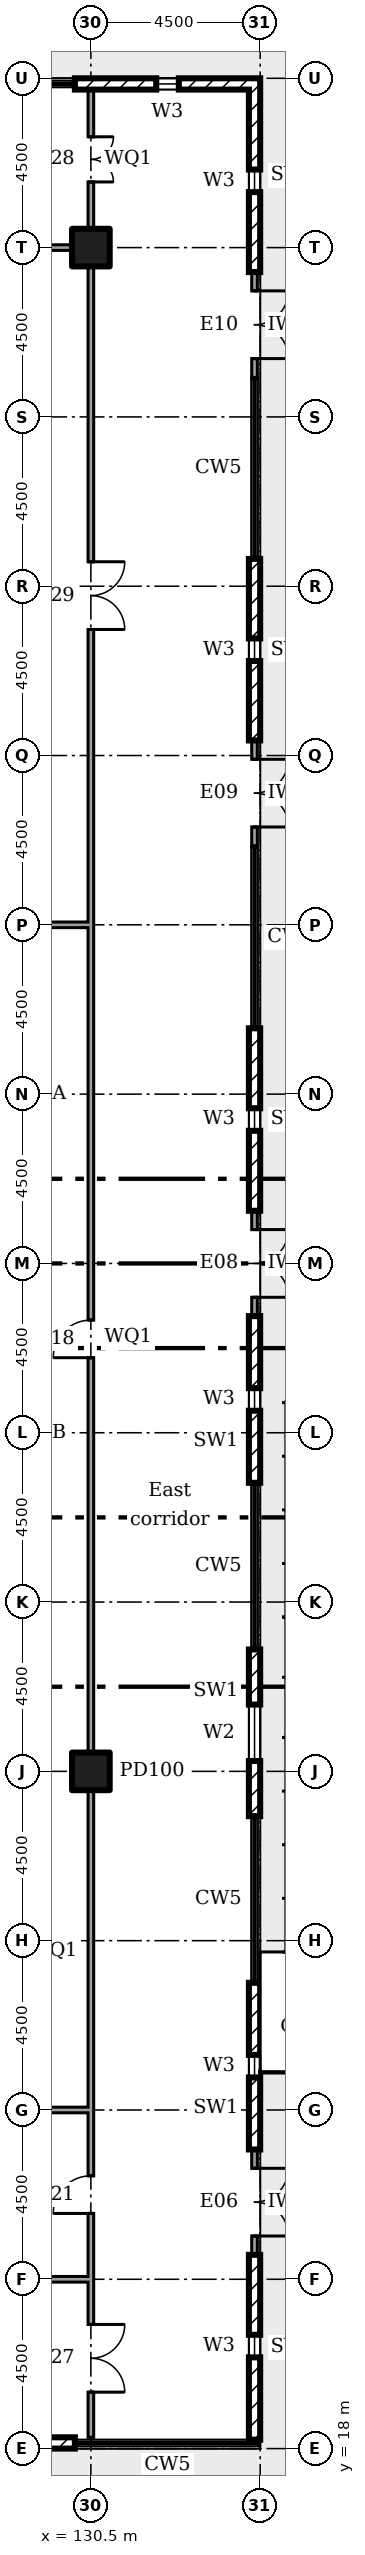
"""IFC4 building model, lengths in metres.
Left out: names, types, materials, properties, quantities, classifications, styles, units other than length and angle.
Written with IfcOpenShell. Run it as: python <this file> out.ifc"""

import sys

from ifc_helpers import new_model, si_unit, direction, frame, frame_2d, origin, origin_2d, place, context, subcontext, project, spatial, rectangle, extrude, element, fill, save


model = new_model("IFC4")
c1 = context("Model", 3, precision=1e-05, world=origin(), true_north=direction((0.0, 1.0)))
c2 = subcontext(c1, "Body", "Model", "MODEL_VIEW")
j1 = project(units=[si_unit("LENGTHUNIT", "METRE"), si_unit("PLANEANGLEUNIT", "RADIAN")], contexts=[c1])
p1 = place(None, origin())
s1 = spatial("IfcSite", under=j1, at=p1, CompositionType="ELEMENT")
p2 = place(p1, origin())
s2 = spatial("IfcBuilding", under=s1, at=p2, CompositionType="ELEMENT")
p3 = place(p2, frame((0.0, 0.0, 11.5)))
s3 = spatial("IfcBuildingStorey", under=s2, at=p3, CompositionType="ELEMENT", Elevation=11.5)
for number, where in (
    (1, (130.5, 36.0, 0.0)),
    (2, (130.5, 76.5, 0.0)),
):
    element("IfcColumn", number, at=place(p3, frame(where)), inside=s3, PredefinedType="COLUMN", context=c2, shape_type="SweptSolid", body=[
        extrude(rectangle(XDim=1.0, YDim=1.0, at=origin_2d()), origin(), (0.0, 0.0, 1.0), 5.0),
    ])
p4 = place(p3, frame((125.15, 18.15, 0.0)))
e3 = element("IfcWall", 3, at=p4, inside=s3, PredefinedType="ELEMENTEDWALL", context=c2, shape_type="SweptSolid", body=[
    extrude(rectangle(XDim=4.925, YDim=0.3, at=frame_2d((2.462, 0.0))), origin(), (0.0, 0.0, 1.0), 4.55),
])
p5 = place(p4, frame((2.163, 0.0, 0.45)))
e4 = element("IfcOpeningElement", 4, at=p5, cuts=e3, PredefinedType="OPENING", context=c2, shape_type="SweptSolid", body=[
    extrude(rectangle(XDim=0.6, YDim=2.4, at=frame_2d((0.3, 1.2))), frame((0.0, 0.16, 0.0), z_axis=(0.0, -1.0, 0.0), x_axis=(1.0, 0.0, 0.0)), (0.0, 0.0, 1.0), 0.32),
])
p6 = place(p3, frame((134.85, 18.238, 0.0), z_axis=(0.0, 0.0, 1.0), x_axis=(0.0, 1.0, 0.0)))
e5 = element("IfcWall", 5, at=p6, inside=s3, PredefinedType="ELEMENTEDWALL", context=c2, shape_type="SweptSolid", body=[
    extrude(rectangle(XDim=4.912, YDim=0.3, at=frame_2d((2.456, 0.0))), origin(), (0.0, 0.0, 1.0), 4.55),
])
p7 = place(p6, frame((2.188, 0.0, 0.45)))
e6 = element("IfcOpeningElement", 6, at=p7, cuts=e5, PredefinedType="OPENING", context=c2, shape_type="SweptSolid", body=[
    extrude(rectangle(XDim=0.6, YDim=2.4, at=frame_2d((0.3, 1.2))), frame((0.0, 0.16, 0.0), z_axis=(0.0, -1.0, 0.0), x_axis=(1.0, 0.0, 0.0)), (0.0, 0.0, 1.0), 0.32),
])
p8 = place(p3, frame((134.85, 23.15, 0.0), z_axis=(0.0, 0.0, 1.0), x_axis=(0.0, 1.0, 0.0)))
e7 = element("IfcWall", 7, at=p8, inside=s3, PredefinedType="SOLIDWALL", context=c2, shape_type="SweptSolid", body=[
    extrude(rectangle(XDim=2.8, YDim=0.15, at=frame_2d((1.4, 0.0))), origin(), (0.0, 0.0, 1.0), 4.55),
])
p9 = place(p8, frame((0.5, 0.0, 0.0)))
e8 = element("IfcOpeningElement", 8, at=p9, cuts=e7, PredefinedType="OPENING", context=c2, shape_type="SweptSolid", body=[
    extrude(rectangle(XDim=1.8, YDim=2.4, at=frame_2d((0.9, 1.2))), frame((0.0, 0.085, 0.0), z_axis=(0.0, -1.0, 0.0), x_axis=(1.0, 0.0, 0.0)), (0.0, 0.0, 1.0), 0.17),
])
p10 = place(p3, frame((134.85, 25.95, 0.0), z_axis=(0.0, 0.0, 1.0), x_axis=(0.0, 1.0, 0.0)))
e9 = element("IfcWall", 9, at=p10, inside=s3, PredefinedType="ELEMENTEDWALL", context=c2, shape_type="SweptSolid", body=[
    extrude(rectangle(XDim=4.43, YDim=0.3, at=frame_2d((2.215, 0.0))), origin(), (0.0, 0.0, 1.0), 4.55),
])
p11 = place(p10, frame((1.915, 0.0, 0.45)))
e10 = element("IfcOpeningElement", 10, at=p11, cuts=e9, PredefinedType="OPENING", context=c2, shape_type="SweptSolid", body=[
    extrude(rectangle(XDim=0.6, YDim=2.4, at=frame_2d((0.3, 1.2))), frame((0.0, 0.16, 0.0), z_axis=(0.0, -1.0, 0.0), x_axis=(1.0, 0.0, 0.0)), (0.0, 0.0, 1.0), 0.32),
])
p12 = place(p3, frame((134.85, 34.81, 0.0), z_axis=(0.0, 0.0, 1.0), x_axis=(0.0, 1.0, 0.0)))
e11 = element("IfcWall", 11, at=p12, inside=s3, PredefinedType="ELEMENTEDWALL", context=c2, shape_type="SweptSolid", body=[
    extrude(rectangle(XDim=4.43, YDim=0.3, at=frame_2d((2.215, 0.0))), origin(), (0.0, 0.0, 1.0), 4.55),
])
p13 = place(p12, frame((1.465, 0.0, 0.9)))
e12 = element("IfcOpeningElement", 12, at=p13, cuts=e11, PredefinedType="OPENING", context=c2, shape_type="SweptSolid", body=[
    extrude(rectangle(XDim=1.5, YDim=1.8, at=frame_2d((0.75, 0.9))), frame((0.0, 0.16, 0.0), z_axis=(0.0, -1.0, 0.0), x_axis=(1.0, 0.0, 0.0)), (0.0, 0.0, 1.0), 0.32),
])
p14 = place(p3, frame((134.85, 43.67, 0.0), z_axis=(0.0, 0.0, 1.0), x_axis=(0.0, 1.0, 0.0)))
e13 = element("IfcWall", 13, at=p14, inside=s3, PredefinedType="ELEMENTEDWALL", context=c2, shape_type="SweptSolid", body=[
    extrude(rectangle(XDim=4.43, YDim=0.3, at=frame_2d((2.215, 0.0))), origin(), (0.0, 0.0, 1.0), 4.55),
])
p15 = place(p14, frame((1.915, 0.0, 0.45)))
e14 = element("IfcOpeningElement", 14, at=p15, cuts=e13, PredefinedType="OPENING", context=c2, shape_type="SweptSolid", body=[
    extrude(rectangle(XDim=0.6, YDim=2.4, at=frame_2d((0.3, 1.2))), frame((0.0, 0.16, 0.0), z_axis=(0.0, -1.0, 0.0), x_axis=(1.0, 0.0, 0.0)), (0.0, 0.0, 1.0), 0.32),
])
p16 = place(p3, frame((134.85, 48.1, 0.0), z_axis=(0.0, 0.0, 1.0), x_axis=(0.0, 1.0, 0.0)))
e15 = element("IfcWall", 15, at=p16, inside=s3, PredefinedType="SOLIDWALL", context=c2, shape_type="SweptSolid", body=[
    extrude(rectangle(XDim=2.8, YDim=0.15, at=frame_2d((1.4, 0.0))), origin(), (0.0, 0.0, 1.0), 4.55),
])
p17 = place(p16, frame((0.5, 0.0, 0.0)))
e16 = element("IfcOpeningElement", 16, at=p17, cuts=e15, PredefinedType="OPENING", context=c2, shape_type="SweptSolid", body=[
    extrude(rectangle(XDim=1.8, YDim=2.4, at=frame_2d((0.9, 1.2))), frame((0.0, 0.085, 0.0), z_axis=(0.0, -1.0, 0.0), x_axis=(1.0, 0.0, 0.0)), (0.0, 0.0, 1.0), 0.17),
])
p18 = place(p3, frame((134.85, 50.9, 0.0), z_axis=(0.0, 0.0, 1.0), x_axis=(0.0, 1.0, 0.0)))
e17 = element("IfcWall", 17, at=p18, inside=s3, PredefinedType="ELEMENTEDWALL", context=c2, shape_type="SweptSolid", body=[
    extrude(rectangle(XDim=4.85, YDim=0.3, at=frame_2d((2.425, 0.0))), origin(), (0.0, 0.0, 1.0), 4.55),
])
p19 = place(p18, frame((2.125, 0.0, 0.45)))
e18 = element("IfcOpeningElement", 18, at=p19, cuts=e17, PredefinedType="OPENING", context=c2, shape_type="SweptSolid", body=[
    extrude(rectangle(XDim=0.6, YDim=2.4, at=frame_2d((0.3, 1.2))), frame((0.0, 0.16, 0.0), z_axis=(0.0, -1.0, 0.0), x_axis=(1.0, 0.0, 0.0)), (0.0, 0.0, 1.0), 0.32),
])
p20 = place(p3, frame((134.85, 60.6, 0.0), z_axis=(0.0, 0.0, 1.0), x_axis=(0.0, 1.0, 0.0)))
e19 = element("IfcWall", 19, at=p20, inside=s3, PredefinedType="SOLIDWALL", context=c2, shape_type="SweptSolid", body=[
    extrude(rectangle(XDim=2.8, YDim=0.15, at=frame_2d((1.4, 0.0))), origin(), (0.0, 0.0, 1.0), 4.55),
])
p21 = place(p20, frame((0.5, 0.0, 0.0)))
e20 = element("IfcOpeningElement", 20, at=p21, cuts=e19, PredefinedType="OPENING", context=c2, shape_type="SweptSolid", body=[
    extrude(rectangle(XDim=1.8, YDim=2.4, at=frame_2d((0.9, 1.2))), frame((0.0, 0.085, 0.0), z_axis=(0.0, -1.0, 0.0), x_axis=(1.0, 0.0, 0.0)), (0.0, 0.0, 1.0), 0.17),
])
p22 = place(p3, frame((134.85, 63.4, 0.0), z_axis=(0.0, 0.0, 1.0), x_axis=(0.0, 1.0, 0.0)))
e21 = element("IfcWall", 21, at=p22, inside=s3, PredefinedType="ELEMENTEDWALL", context=c2, shape_type="SweptSolid", body=[
    extrude(rectangle(XDim=4.825, YDim=0.3, at=frame_2d((2.413, 0.0))), origin(), (0.0, 0.0, 1.0), 4.55),
])
p23 = place(p22, frame((2.113, 0.0, 0.45)))
e22 = element("IfcOpeningElement", 22, at=p23, cuts=e21, PredefinedType="OPENING", context=c2, shape_type="SweptSolid", body=[
    extrude(rectangle(XDim=0.6, YDim=2.4, at=frame_2d((0.3, 1.2))), frame((0.0, 0.16, 0.0), z_axis=(0.0, -1.0, 0.0), x_axis=(1.0, 0.0, 0.0)), (0.0, 0.0, 1.0), 0.32),
])
p24 = place(p3, frame((134.85, 73.05, 0.0), z_axis=(0.0, 0.0, 1.0), x_axis=(0.0, 1.0, 0.0)))
e23 = element("IfcWall", 23, at=p24, inside=s3, PredefinedType="SOLIDWALL", context=c2, shape_type="SweptSolid", body=[
    extrude(rectangle(XDim=2.8, YDim=0.15, at=frame_2d((1.4, 0.0))), origin(), (0.0, 0.0, 1.0), 4.55),
])
p25 = place(p24, frame((0.5, 0.0, 0.0)))
e24 = element("IfcOpeningElement", 24, at=p25, cuts=e23, PredefinedType="OPENING", context=c2, shape_type="SweptSolid", body=[
    extrude(rectangle(XDim=1.8, YDim=2.4, at=frame_2d((0.9, 1.2))), frame((0.0, 0.085, 0.0), z_axis=(0.0, -1.0, 0.0), x_axis=(1.0, 0.0, 0.0)), (0.0, 0.0, 1.0), 0.17),
])
p26 = place(p3, frame((134.85, 75.85, 0.0), z_axis=(0.0, 0.0, 1.0), x_axis=(0.0, 1.0, 0.0)))
e25 = element("IfcWall", 25, at=p26, inside=s3, PredefinedType="ELEMENTEDWALL", context=c2, shape_type="SweptSolid", body=[
    extrude(rectangle(XDim=5.15, YDim=0.3, at=frame_2d((2.575, 0.0))), origin(), (0.0, 0.0, 1.0), 4.55),
])
p27 = place(p26, frame((2.125, 0.0, 0.45)))
e26 = element("IfcOpeningElement", 26, at=p27, cuts=e25, PredefinedType="OPENING", context=c2, shape_type="SweptSolid", body=[
    extrude(rectangle(XDim=0.6, YDim=2.4, at=frame_2d((0.3, 1.2))), frame((0.0, 0.16, 0.0), z_axis=(0.0, -1.0, 0.0), x_axis=(1.0, 0.0, 0.0)), (0.0, 0.0, 1.0), 0.32),
])
p28 = place(p3, frame((134.7, 80.85, 0.0), z_axis=(0.0, 0.0, 1.0), x_axis=(-1.0, 0.0, 0.0)))
e27 = element("IfcWall", 27, at=p28, inside=s3, PredefinedType="ELEMENTEDWALL", context=c2, shape_type="SweptSolid", body=[
    extrude(rectangle(XDim=4.625, YDim=0.3, at=frame_2d((2.312, 0.0))), origin(), (0.0, 0.0, 1.0), 4.55),
])
p29 = place(p28, frame((1.863, 0.0, 0.45)))
e28 = element("IfcOpeningElement", 28, at=p29, cuts=e27, PredefinedType="OPENING", context=c2, shape_type="SweptSolid", body=[
    extrude(rectangle(XDim=0.6, YDim=2.4, at=frame_2d((0.3, 1.2))), frame((0.0, 0.16, 0.0), z_axis=(0.0, -1.0, 0.0), x_axis=(1.0, 0.0, 0.0)), (0.0, 0.0, 1.0), 0.32),
])
p30 = place(p3, frame((130.5, 18.3, 0.0), z_axis=(0.0, 0.0, 1.0), x_axis=(0.0, 1.0, 0.0)))
e29 = element("IfcWall", 29, at=p30, inside=s3, PredefinedType="PARTITIONING", context=c2, shape_type="SweptSolid", body=[
    extrude(rectangle(XDim=4.275, YDim=0.15, at=frame_2d((2.137, 0.0))), origin(), (0.0, 0.0, 1.0), 4.55),
])
p31 = place(p30, frame((1.2, 0.0, 0.0)))
e30 = element("IfcOpeningElement", 30, at=p31, cuts=e29, PredefinedType="OPENING", context=c2, shape_type="SweptSolid", body=[
    extrude(rectangle(XDim=1.8, YDim=2.1, at=frame_2d((0.9, 1.05))), frame((0.0, 0.085, 0.0), z_axis=(0.0, -1.0, 0.0), x_axis=(1.0, 0.0, 0.0)), (0.0, 0.0, 1.0), 0.17),
])
p32 = place(p3, frame((130.5, 76.995, 0.0), z_axis=(0.0, 0.0, 1.0), x_axis=(0.0, 1.0, 0.0)))
e31 = element("IfcWall", 31, at=p32, inside=s3, PredefinedType="PARTITIONING", context=c2, shape_type="SweptSolid", body=[
    extrude(rectangle(XDim=3.705, YDim=0.15, at=frame_2d((1.853, 0.0))), origin(), (0.0, 0.0, 1.0), 4.55),
])
p33 = place(p32, frame((1.25, 0.0, 0.0)))
e32 = element("IfcOpeningElement", 32, at=p33, cuts=e31, PredefinedType="OPENING", context=c2, shape_type="SweptSolid", body=[
    extrude(rectangle(XDim=1.2, YDim=2.1, at=frame_2d((0.6, 1.05))), frame((0.0, 0.085, 0.0), z_axis=(0.0, -1.0, 0.0), x_axis=(1.0, 0.0, 0.0)), (0.0, 0.0, 1.0), 0.17),
])
p34 = place(p3, frame((130.5, 26.925, 0.0), z_axis=(0.0, 0.0, 1.0), x_axis=(0.0, 1.0, 0.0)))
e33 = element("IfcWall", 33, at=p34, inside=s3, PredefinedType="PARTITIONING", context=c2, shape_type="SweptSolid", body=[
    extrude(rectangle(XDim=8.58, YDim=0.15, at=frame_2d((4.29, 0.0))), origin(), (0.0, 0.0, 1.0), 4.55),
])
p35 = place(p3, frame((130.5, 36.495, 0.0), z_axis=(0.0, 0.0, 1.0), x_axis=(0.0, 1.0, 0.0)))
e34 = element("IfcWall", 34, at=p35, inside=s3, PredefinedType="PARTITIONING", context=c2, shape_type="SweptSolid", body=[
    extrude(rectangle(XDim=22.08, YDim=0.15, at=frame_2d((11.04, 0.0))), origin(), (0.0, 0.0, 1.0), 4.55),
])
p36 = place(p35, frame((10.5, 0.0, 0.0)))
e35 = element("IfcOpeningElement", 35, at=p36, cuts=e34, PredefinedType="OPENING", context=c2, shape_type="SweptSolid", body=[
    extrude(rectangle(XDim=1.0, YDim=2.1, at=frame_2d((0.5, 1.05))), frame((0.0, 0.085, 0.0), z_axis=(0.0, -1.0, 0.0), x_axis=(1.0, 0.0, 0.0)), (0.0, 0.0, 1.0), 0.17),
])
p37 = place(p3, frame((130.5, 58.5, 0.0), z_axis=(0.0, 0.0, 1.0), x_axis=(0.0, 1.0, 0.0)))
e36 = element("IfcWall", 36, at=p37, inside=s3, PredefinedType="PARTITIONING", context=c2, shape_type="SweptSolid", body=[
    extrude(rectangle(XDim=17.505, YDim=0.15, at=frame_2d((8.752, 0.0))), origin(), (0.0, 0.0, 1.0), 4.55),
])
p38 = place(p37, frame((7.85, 0.0, 0.0)))
e37 = element("IfcOpeningElement", 37, at=p38, cuts=e36, PredefinedType="OPENING", context=c2, shape_type="SweptSolid", body=[
    extrude(rectangle(XDim=1.8, YDim=2.1, at=frame_2d((0.9, 1.05))), frame((0.0, 0.085, 0.0), z_axis=(0.0, -1.0, 0.0), x_axis=(1.0, 0.0, 0.0)), (0.0, 0.0, 1.0), 0.17),
])
p39 = place(p3, frame((130.5, 22.5, 0.0), z_axis=(0.0, 0.0, 1.0), x_axis=(0.0, 1.0, 0.0)))
e38 = element("IfcWall", 38, at=p39, inside=s3, PredefinedType="PARTITIONING", context=c2, shape_type="SweptSolid", body=[
    extrude(rectangle(XDim=4.5, YDim=0.15, at=frame_2d((2.25, 0.0))), origin(), (0.0, 0.0, 1.0), 4.55),
])
p40 = place(p39, frame((1.75, 0.0, 0.0)))
e39 = element("IfcOpeningElement", 39, at=p40, cuts=e38, PredefinedType="OPENING", context=c2, shape_type="SweptSolid", body=[
    extrude(rectangle(XDim=1.0, YDim=2.1, at=frame_2d((0.5, 1.05))), frame((0.0, 0.085, 0.0), z_axis=(0.0, -1.0, 0.0), x_axis=(1.0, 0.0, 0.0)), (0.0, 0.0, 1.0), 0.17),
])
p41 = place(p3, frame((126.0, 22.5, 0.0)))
e40 = element("IfcWall", 40, at=p41, inside=s3, PredefinedType="PARTITIONING", context=c2, shape_type="SweptSolid", body=[
    extrude(rectangle(XDim=4.425, YDim=0.15, at=frame_2d((2.212, 0.0))), origin(), (0.0, 0.0, 1.0), 4.55),
])
p42 = place(p3, frame((117.495, 76.5, 0.0)))
e41 = element("IfcWall", 41, at=p42, inside=s3, PredefinedType="PARTITIONING", context=c2, shape_type="SweptSolid", body=[
    extrude(rectangle(XDim=12.51, YDim=0.15, at=frame_2d((6.255, 0.0))), origin(), (0.0, 0.0, 1.0), 4.55),
])
p43 = place(p42, frame((5.35, 0.0, 0.0)))
e42 = element("IfcOpeningElement", 42, at=p43, cuts=e41, PredefinedType="OPENING", context=c2, shape_type="SweptSolid", body=[
    extrude(rectangle(XDim=1.8, YDim=2.1, at=frame_2d((0.9, 1.05))), frame((0.0, 0.085, 0.0), z_axis=(0.0, -1.0, 0.0), x_axis=(1.0, 0.0, 0.0)), (0.0, 0.0, 1.0), 0.17),
])
for number, where in (
    (43, (126.075, 58.5, 0.0)),
    (44, (126.075, 27.0, 0.0)),
):
    element("IfcWall", number, at=place(p3, frame(where)), inside=s3, PredefinedType="PARTITIONING", context=c2, shape_type="SweptSolid", body=[
        extrude(rectangle(XDim=4.35, YDim=0.15, at=frame_2d((2.175, 0.0))), origin(), (0.0, 0.0, 1.0), 4.55),
    ])
p44 = place(p7, origin())
e45 = element("IfcWindow", 45, at=p44, inside=s3, PartitioningType="SINGLE_PANEL", PredefinedType="WINDOW", context=c2, shape_type="SweptSolid", body=[
    extrude(rectangle(XDim=0.6, YDim=2.4, at=frame_2d((0.3, 1.2))), frame((0.0, 0.03, 0.0), z_axis=(0.0, -1.0, 0.0), x_axis=(1.0, 0.0, 0.0)), (0.0, 0.0, 1.0), 0.06),
])
fill(e6, e45)
p45 = place(p9, frame((1.8, 0.0, 0.0), x_axis=(-1.0, 0.0, 0.0)))
e46 = element("IfcDoor", 46, at=p45, inside=s3, OperationType="DOUBLE_DOOR_DOUBLE_SWING", PredefinedType="NOTDEFINED", context=c2, shape_type="SweptSolid", body=[
    extrude(rectangle(XDim=1.8, YDim=2.4, at=frame_2d((0.9, 1.2))), frame((0.0, 0.025, 0.0), z_axis=(0.0, -1.0, 0.0), x_axis=(1.0, 0.0, 0.0)), (0.0, 0.0, 1.0), 0.05),
])
fill(e8, e46)
p46 = place(p11, origin())
e47 = element("IfcWindow", 47, at=p46, inside=s3, PartitioningType="SINGLE_PANEL", PredefinedType="WINDOW", context=c2, shape_type="SweptSolid", body=[
    extrude(rectangle(XDim=0.6, YDim=2.4, at=frame_2d((0.3, 1.2))), frame((0.0, 0.03, 0.0), z_axis=(0.0, -1.0, 0.0), x_axis=(1.0, 0.0, 0.0)), (0.0, 0.0, 1.0), 0.06),
])
fill(e10, e47)
p47 = place(p13, origin())
e48 = element("IfcWindow", 48, at=p47, inside=s3, PartitioningType="SINGLE_PANEL", PredefinedType="WINDOW", context=c2, shape_type="SweptSolid", body=[
    extrude(rectangle(XDim=1.5, YDim=1.8, at=frame_2d((0.75, 0.9))), frame((0.0, 0.03, 0.0), z_axis=(0.0, -1.0, 0.0), x_axis=(1.0, 0.0, 0.0)), (0.0, 0.0, 1.0), 0.06),
])
fill(e12, e48)
p48 = place(p15, origin())
e49 = element("IfcWindow", 49, at=p48, inside=s3, PartitioningType="SINGLE_PANEL", PredefinedType="WINDOW", context=c2, shape_type="SweptSolid", body=[
    extrude(rectangle(XDim=0.6, YDim=2.4, at=frame_2d((0.3, 1.2))), frame((0.0, 0.03, 0.0), z_axis=(0.0, -1.0, 0.0), x_axis=(1.0, 0.0, 0.0)), (0.0, 0.0, 1.0), 0.06),
])
fill(e14, e49)
p49 = place(p17, frame((1.8, 0.0, 0.0), x_axis=(-1.0, 0.0, 0.0)))
e50 = element("IfcDoor", 50, at=p49, inside=s3, OperationType="DOUBLE_DOOR_DOUBLE_SWING", PredefinedType="NOTDEFINED", context=c2, shape_type="SweptSolid", body=[
    extrude(rectangle(XDim=1.8, YDim=2.4, at=frame_2d((0.9, 1.2))), frame((0.0, 0.025, 0.0), z_axis=(0.0, -1.0, 0.0), x_axis=(1.0, 0.0, 0.0)), (0.0, 0.0, 1.0), 0.05),
])
fill(e16, e50)
p50 = place(p19, origin())
e51 = element("IfcWindow", 51, at=p50, inside=s3, PartitioningType="SINGLE_PANEL", PredefinedType="WINDOW", context=c2, shape_type="SweptSolid", body=[
    extrude(rectangle(XDim=0.6, YDim=2.4, at=frame_2d((0.3, 1.2))), frame((0.0, 0.03, 0.0), z_axis=(0.0, -1.0, 0.0), x_axis=(1.0, 0.0, 0.0)), (0.0, 0.0, 1.0), 0.06),
])
fill(e18, e51)
p51 = place(p21, frame((1.8, 0.0, 0.0), x_axis=(-1.0, 0.0, 0.0)))
e52 = element("IfcDoor", 52, at=p51, inside=s3, OperationType="DOUBLE_DOOR_DOUBLE_SWING", PredefinedType="NOTDEFINED", context=c2, shape_type="SweptSolid", body=[
    extrude(rectangle(XDim=1.8, YDim=2.4, at=frame_2d((0.9, 1.2))), frame((0.0, 0.025, 0.0), z_axis=(0.0, -1.0, 0.0), x_axis=(1.0, 0.0, 0.0)), (0.0, 0.0, 1.0), 0.05),
])
fill(e20, e52)
p52 = place(p23, origin())
e53 = element("IfcWindow", 53, at=p52, inside=s3, PartitioningType="SINGLE_PANEL", PredefinedType="WINDOW", context=c2, shape_type="SweptSolid", body=[
    extrude(rectangle(XDim=0.6, YDim=2.4, at=frame_2d((0.3, 1.2))), frame((0.0, 0.03, 0.0), z_axis=(0.0, -1.0, 0.0), x_axis=(1.0, 0.0, 0.0)), (0.0, 0.0, 1.0), 0.06),
])
fill(e22, e53)
p53 = place(p25, frame((1.8, 0.0, 0.0), x_axis=(-1.0, 0.0, 0.0)))
e54 = element("IfcDoor", 54, at=p53, inside=s3, OperationType="DOUBLE_DOOR_DOUBLE_SWING", PredefinedType="NOTDEFINED", context=c2, shape_type="SweptSolid", body=[
    extrude(rectangle(XDim=1.8, YDim=2.4, at=frame_2d((0.9, 1.2))), frame((0.0, 0.025, 0.0), z_axis=(0.0, -1.0, 0.0), x_axis=(1.0, 0.0, 0.0)), (0.0, 0.0, 1.0), 0.05),
])
fill(e24, e54)
p54 = place(p27, origin())
e55 = element("IfcWindow", 55, at=p54, inside=s3, PartitioningType="SINGLE_PANEL", PredefinedType="WINDOW", context=c2, shape_type="SweptSolid", body=[
    extrude(rectangle(XDim=0.6, YDim=2.4, at=frame_2d((0.3, 1.2))), frame((0.0, 0.03, 0.0), z_axis=(0.0, -1.0, 0.0), x_axis=(1.0, 0.0, 0.0)), (0.0, 0.0, 1.0), 0.06),
])
fill(e26, e55)
p55 = place(p29, origin())
e56 = element("IfcWindow", 56, at=p55, inside=s3, PartitioningType="SINGLE_PANEL", PredefinedType="WINDOW", context=c2, shape_type="SweptSolid", body=[
    extrude(rectangle(XDim=0.6, YDim=2.4, at=frame_2d((0.3, 1.2))), frame((0.0, 0.03, 0.0), z_axis=(0.0, -1.0, 0.0), x_axis=(1.0, 0.0, 0.0)), (0.0, 0.0, 1.0), 0.06),
])
fill(e28, e56)
p56 = place(p36, origin())
e57 = element("IfcDoor", 57, at=p56, inside=s3, OperationType="SINGLE_SWING_RIGHT", PredefinedType="DOOR", context=c2, shape_type="SweptSolid", body=[
    extrude(rectangle(XDim=1.0, YDim=2.1, at=frame_2d((0.5, 1.05))), frame((0.0, 0.025, 0.0), z_axis=(0.0, -1.0, 0.0), x_axis=(1.0, 0.0, 0.0)), (0.0, 0.0, 1.0), 0.05),
])
fill(e35, e57)
p57 = place(p40, origin())
e58 = element("IfcDoor", 58, at=p57, inside=s3, OperationType="SINGLE_SWING_RIGHT", PredefinedType="DOOR", context=c2, shape_type="SweptSolid", body=[
    extrude(rectangle(XDim=1.0, YDim=2.1, at=frame_2d((0.5, 1.05))), frame((0.0, 0.025, 0.0), z_axis=(0.0, -1.0, 0.0), x_axis=(1.0, 0.0, 0.0)), (0.0, 0.0, 1.0), 0.05),
])
fill(e39, e58)
p58 = place(p31, frame((1.8, 0.0, 0.0), x_axis=(-1.0, 0.0, 0.0)))
e59 = element("IfcDoor", 59, at=p58, inside=s3, OperationType="DOUBLE_DOOR_SINGLE_SWING", PredefinedType="DOOR", context=c2, shape_type="SweptSolid", body=[
    extrude(rectangle(XDim=1.8, YDim=2.1, at=frame_2d((0.9, 1.05))), frame((0.0, 0.025, 0.0), z_axis=(0.0, -1.0, 0.0), x_axis=(1.0, 0.0, 0.0)), (0.0, 0.0, 1.0), 0.05),
])
fill(e30, e59)
p59 = place(p33, frame((1.2, 0.0, 0.0), x_axis=(-1.0, 0.0, 0.0)))
e60 = element("IfcDoor", 60, at=p59, inside=s3, OperationType="DOUBLE_DOOR_SINGLE_SWING", PredefinedType="DOOR", context=c2, shape_type="SweptSolid", body=[
    extrude(rectangle(XDim=1.2, YDim=2.1, at=frame_2d((0.6, 1.05))), frame((0.0, 0.025, 0.0), z_axis=(0.0, -1.0, 0.0), x_axis=(1.0, 0.0, 0.0)), (0.0, 0.0, 1.0), 0.05),
])
fill(e32, e60)
p60 = place(p38, frame((1.8, 0.0, 0.0), x_axis=(-1.0, 0.0, 0.0)))
e61 = element("IfcDoor", 61, at=p60, inside=s3, OperationType="DOUBLE_DOOR_SINGLE_SWING", PredefinedType="DOOR", context=c2, shape_type="SweptSolid", body=[
    extrude(rectangle(XDim=1.8, YDim=2.1, at=frame_2d((0.9, 1.05))), frame((0.0, 0.025, 0.0), z_axis=(0.0, -1.0, 0.0), x_axis=(1.0, 0.0, 0.0)), (0.0, 0.0, 1.0), 0.05),
])
fill(e37, e61)
save(model, sys.argv[1])
